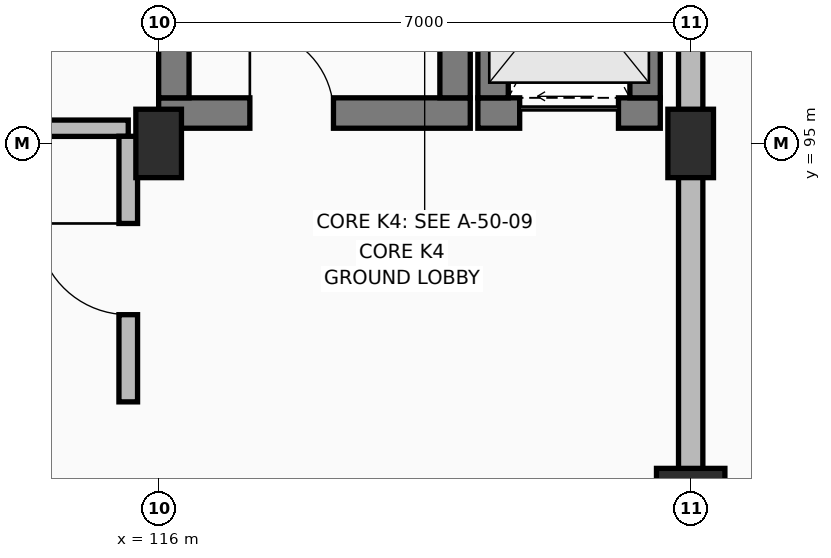
"""IFC4 building model, lengths in metres.
Left out: names, types, materials, properties, quantities, classifications, styles, units other than length and angle.
Written with IfcOpenShell. Run it as: python <this file> out.ifc"""

import sys

from ifc_helpers import new_model, si_unit, direction, frame, frame_2d, origin, origin_2d, place, context, subcontext, project, spatial, rectangle, extrude, element, fill, save


model = new_model("IFC4")
c1 = context("Model", 3, precision=1e-05, world=origin(), true_north=direction((0.0, 1.0)))
c2 = subcontext(c1, "Body", "Model", "MODEL_VIEW")
j1 = project(units=[si_unit("LENGTHUNIT", "METRE"), si_unit("PLANEANGLEUNIT", "RADIAN")], contexts=[c1])
p1 = place(None, origin())
s1 = spatial("IfcSite", under=j1, at=p1, CompositionType="ELEMENT")
p2 = place(p1, origin())
s2 = spatial("IfcBuilding", under=s1, at=p2, CompositionType="ELEMENT")
p3 = place(p2, origin())
s3 = spatial("IfcBuildingStorey", under=s2, at=p3, CompositionType="ELEMENT", Elevation=0.0)
for number, where, z_axis, x_axis in (
    (1, (116.0, 95.0, 0.0), (0.0, 0.0, 1.0), (1.0, 0.0, 0.0)),
    (2, (123.0, 95.0, 0.0), (0.0, 0.0, 1.0), (1.0, 0.0, 0.0)),
):
    element("IfcColumn", number, at=place(p3, frame(where, z_axis=z_axis, x_axis=x_axis)), inside=s3, PredefinedType="COLUMN", context=c2, shape_type="SweptSolid", body=[
        extrude(rectangle(XDim=0.6, YDim=0.9, at=origin_2d()), origin(), (0.0, 0.0, 1.0), 4.8),
    ])
p4 = place(p3, frame((123.0, 90.5, 0.0), z_axis=(0.0, 0.0, 1.0), x_axis=(0.0, 1.0, 0.0)))
e3 = element("IfcColumn", 3, at=p4, inside=s3, PredefinedType="PILASTER", context=c2, shape_type="SweptSolid", body=[
    extrude(rectangle(XDim=0.45, YDim=0.9, at=origin_2d()), origin(), (0.0, 0.0, 1.0), 4.8),
])
for number, where, z_axis, x_axis in (
    (4, (123.0, 90.72, 0.0), (0.0, 0.0, 1.0), (0.0, 1.0, 0.0)),
    (5, (123.0, 95.445, 0.0), (0.0, 0.0, 1.0), (0.0, 1.0, 0.0)),
):
    element("IfcWall", number, at=place(p3, frame(where, z_axis=z_axis, x_axis=x_axis)), inside=s3, PredefinedType="SOLIDWALL", context=c2, shape_type="SweptSolid", body=[
        extrude(rectangle(XDim=3.835, YDim=0.32, at=frame_2d((1.917, 0.0))), origin(), (0.0, 0.0, 1.0), 3.495),
    ])
p5 = place(p3, frame((116.0, 95.4, 0.0), z_axis=(0.0, 0.0, 1.0), x_axis=(1.0, 0.0, 0.0)))
e6 = element("IfcWall", 6, at=p5, inside=s3, PredefinedType="SHEAR", context=c2, shape_type="SweptSolid", body=[
    extrude(rectangle(XDim=4.1, YDim=0.4, at=frame_2d((2.05, 0.0))), origin(), (0.0, 0.0, 1.0), 4.49),
])
p6 = place(p5, frame((1.2, 0.0, 0.0)))
e7 = element("IfcOpeningElement", 7, at=p6, cuts=e6, PredefinedType="OPENING", context=c2, shape_type="SweptSolid", body=[
    extrude(rectangle(XDim=1.1, YDim=2.2, at=frame_2d((0.55, 1.1))), frame((0.0, 0.21, 0.0), z_axis=(0.0, -1.0, 0.0), x_axis=(1.0, 0.0, 0.0)), (0.0, 0.0, 1.0), 0.42),
])
for number, where, z_axis, x_axis in (
    (8, (119.9, 95.6, 0.0), (0.0, 0.0, 1.0), (0.0, 1.0, 0.0)),
    (9, (116.2, 103.0, 0.0), (0.0, 0.0, 1.0), (0.0, -1.0, 0.0)),
):
    element("IfcWall", number, at=place(p3, frame(where, z_axis=z_axis, x_axis=x_axis)), inside=s3, PredefinedType="SHEAR", context=c2, shape_type="SweptSolid", body=[
        extrude(rectangle(XDim=7.4, YDim=0.4, at=frame_2d((3.7, 0.0))), origin(), (0.0, 0.0, 1.0), 4.49),
    ])
p7 = place(p3, frame((120.2, 95.4, 0.0), z_axis=(0.0, 0.0, 1.0), x_axis=(1.0, 0.0, 0.0)))
e10 = element("IfcWall", 10, at=p7, inside=s3, PredefinedType="SHEAR", context=c2, shape_type="SweptSolid", body=[
    extrude(rectangle(XDim=2.4, YDim=0.4, at=frame_2d((1.2, 0.0))), origin(), (0.0, 0.0, 1.0), 4.49),
])
p8 = place(p7, frame((0.55, 0.0, 0.0)))
e11 = element("IfcOpeningElement", 11, at=p8, cuts=e10, PredefinedType="OPENING", context=c2, shape_type="SweptSolid", body=[
    extrude(rectangle(XDim=1.3, YDim=2.25, at=frame_2d((0.65, 1.125))), frame((0.0, 0.21, 0.0), z_axis=(0.0, -1.0, 0.0), x_axis=(1.0, 0.0, 0.0)), (0.0, 0.0, 1.0), 0.42),
])
for number, where, z_axis, x_axis in (
    (12, (122.4, 95.6, 0.0), (0.0, 0.0, 1.0), (0.0, 1.0, 0.0)),
    (13, (120.4, 98.6, 0.0), (0.0, 0.0, 1.0), (0.0, -1.0, 0.0)),
):
    element("IfcWall", number, at=place(p3, frame(where, z_axis=z_axis, x_axis=x_axis)), inside=s3, PredefinedType="SHEAR", context=c2, shape_type="SweptSolid", body=[
        extrude(rectangle(XDim=3.0, YDim=0.4, at=frame_2d((1.5, 0.0))), origin(), (0.0, 0.0, 1.0), 4.49),
    ])
p9 = place(p3, frame((95.2, 95.2, 0.0), z_axis=(0.0, 0.0, 1.0), x_axis=(1.0, 0.0, 0.0)))
e14 = element("IfcWall", 14, at=p9, inside=s3, PredefinedType="PARTITIONING", context=c2, shape_type="SweptSolid", body=[
    extrude(rectangle(XDim=20.4, YDim=0.215, at=frame_2d((10.2, 0.0))), origin(), (0.0, 0.0, 1.0), 3.235),
])
p10 = place(p9, frame((9.65, 0.0, 0.0)))
e15 = element("IfcOpeningElement", 15, at=p10, cuts=e14, PredefinedType="OPENING", context=c2, shape_type="SweptSolid", body=[
    extrude(rectangle(XDim=1.1, YDim=2.2, at=frame_2d((0.55, 1.1))), frame((0.0, 0.117, 0.0), z_axis=(0.0, -1.0, 0.0), x_axis=(1.0, 0.0, 0.0)), (0.0, 0.0, 1.0), 0.235),
])
p11 = place(p3, frame((115.6, 91.6, 0.0), z_axis=(0.0, 0.0, 1.0), x_axis=(0.0, 1.0, 0.0)))
e16 = element("IfcWall", 16, at=p11, inside=s3, PredefinedType="PARTITIONING", context=c2, shape_type="SweptSolid", body=[
    extrude(rectangle(XDim=3.494, YDim=0.245, at=frame_2d((1.747, 0.0))), origin(), (0.0, 0.0, 1.0), 3.235),
])
p12 = place(p11, frame((1.147, 0.0, 0.0)))
e17 = element("IfcOpeningElement", 17, at=p12, cuts=e16, PredefinedType="OPENING", context=c2, shape_type="SweptSolid", body=[
    extrude(rectangle(XDim=1.2, YDim=2.2, at=frame_2d((0.6, 1.1))), frame((0.0, 0.133, 0.0), z_axis=(0.0, -1.0, 0.0), x_axis=(1.0, 0.0, 0.0)), (0.0, 0.0, 1.0), 0.265),
])
p13 = place(p6, origin())
e18 = element("IfcDoor", 18, at=p13, inside=s3, OperationType="SINGLE_SWING_LEFT", PredefinedType="DOOR", context=c2, shape_type="SweptSolid", body=[
    extrude(rectangle(XDim=1.1, YDim=2.2, at=frame_2d((0.55, 1.1))), frame((0.0, 0.025, 0.0), z_axis=(0.0, -1.0, 0.0), x_axis=(1.0, 0.0, 0.0)), (0.0, 0.0, 1.0), 0.05),
])
fill(e7, e18)
p14 = place(p8, origin())
e19 = element("IfcDoor", 19, at=p14, inside=s3, OperationType="SLIDING_TO_LEFT", PredefinedType="DOOR", context=c2, shape_type="SweptSolid", body=[
    extrude(rectangle(XDim=1.3, YDim=2.25, at=frame_2d((0.65, 1.125))), frame((0.0, 0.025, 0.0), z_axis=(0.0, -1.0, 0.0), x_axis=(1.0, 0.0, 0.0)), (0.0, 0.0, 1.0), 0.05),
])
fill(e11, e19)
p15 = place(p12, origin())
e20 = element("IfcDoor", 20, at=p15, inside=s3, OperationType="SINGLE_SWING_RIGHT", PredefinedType="DOOR", context=c2, shape_type="SweptSolid", body=[
    extrude(rectangle(XDim=1.2, YDim=2.2, at=frame_2d((0.6, 1.1))), frame((0.0, 0.025, 0.0), z_axis=(0.0, -1.0, 0.0), x_axis=(1.0, 0.0, 0.0)), (0.0, 0.0, 1.0), 0.05),
])
fill(e17, e20)
save(model, sys.argv[1])
